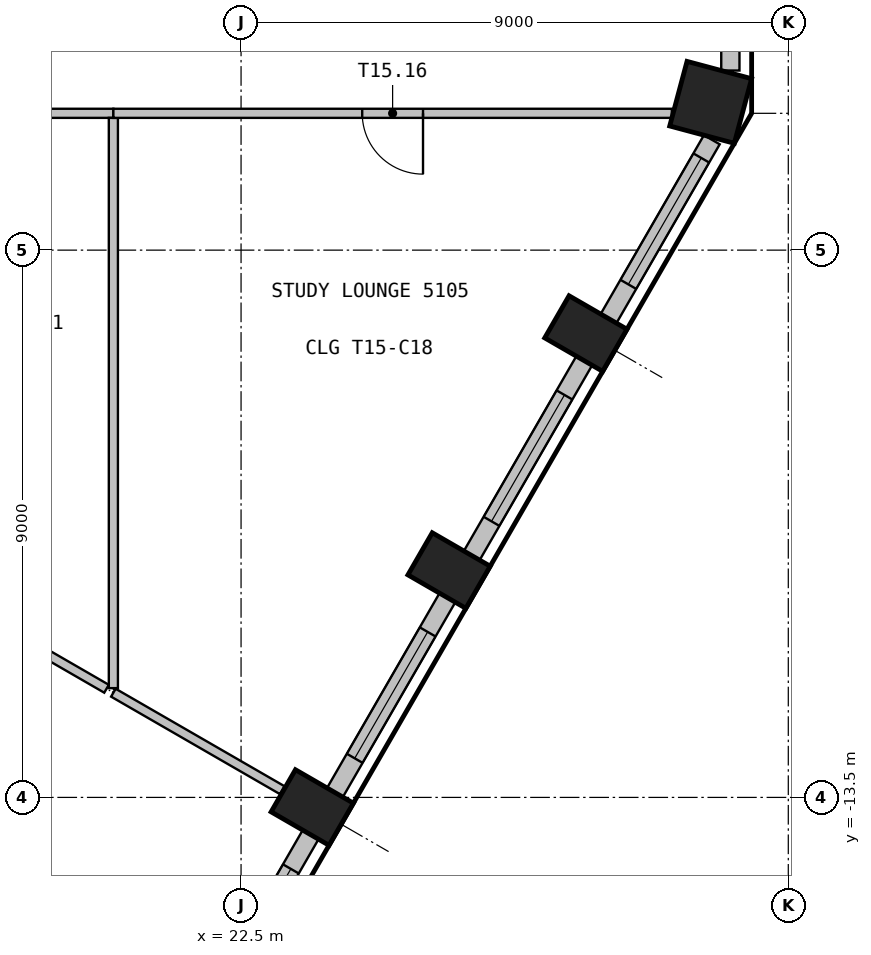
"""IFC4 building model, lengths in metres.
Left out: names, types, materials, properties, quantities, classifications, styles, units other than length and angle.
Written with IfcOpenShell. Run it as: python <this file> out.ifc"""

import sys

from ifc_helpers import new_model, si_unit, direction, frame, frame_2d, origin, origin_2d, place, context, subcontext, project, spatial, rectangle, extrude, element, fill, save


model = new_model("IFC4")
c1 = context("Model", 3, precision=1e-05, world=origin(), true_north=direction((0.0, 1.0)))
c2 = subcontext(c1, "Body", "Model", "MODEL_VIEW")
j1 = project(units=[si_unit("LENGTHUNIT", "METRE"), si_unit("PLANEANGLEUNIT", "RADIAN")], contexts=[c1])
p1 = place(None, origin())
s1 = spatial("IfcSite", under=j1, at=p1, CompositionType="ELEMENT")
p2 = place(p1, origin())
s2 = spatial("IfcBuilding", under=s1, at=p2, CompositionType="ELEMENT")
p3 = place(p2, frame((0.0, 0.0, 207.3)))
s3 = spatial("IfcBuildingStorey", under=s2, at=p3, CompositionType="ELEMENT", Elevation=207.3)
for number, where, z_axis, x_axis in (
    (1, (23.671, -13.666, 0.0), (0.0, 0.0, 1.0), (0.5, 0.866, 0.0)),
    (2, (25.921, -9.769, 0.0), (0.0, 0.0, 1.0), (0.5, 0.866, 0.0)),
    (3, (28.171, -5.872, 0.0), (0.0, 0.0, 1.0), (0.5, 0.866, 0.0)),
):
    element("IfcColumn", number, at=place(p3, frame(where, z_axis=z_axis, x_axis=x_axis)), inside=s3, PredefinedType="COLUMN", context=c2, shape_type="SweptSolid", body=[
        extrude(rectangle(XDim=0.8, YDim=1.1, at=origin_2d()), origin(), (0.0, 0.0, 1.0), 3.55),
    ])
p4 = place(p3, frame((30.223, -2.07, 0.0), z_axis=(0.0, 0.0, 1.0), x_axis=(0.258819045103, 0.965925826289, 0.0)))
e4 = element("IfcColumn", 4, at=p4, inside=s3, PredefinedType="COLUMN", context=c2, shape_type="SweptSolid", body=[
    extrude(rectangle(XDim=1.1, YDim=1.1, at=origin_2d()), origin(), (0.0, 0.0, 1.0), 3.55),
])
p5 = place(p3, frame((21.794, -17.317, 0.0), z_axis=(0.0, 0.0, 1.0), x_axis=(0.500029062817, 0.866008623709, 0.0)))
e5 = element("IfcWall", 5, at=p5, inside=s3, PredefinedType="SOLIDWALL", context=c2, shape_type="SweptSolid", body=[
    extrude(rectangle(XDim=3.699, YDim=0.3, at=frame_2d((1.85, 0.0))), origin(), (0.0, 0.0, 1.0), 3.55),
])
p6 = place(p5, frame((0.649, 0.0, 0.9)))
e6 = element("IfcOpeningElement", 6, at=p6, cuts=e5, PredefinedType="OPENING", context=c2, shape_type="SweptSolid", body=[
    extrude(rectangle(XDim=2.4, YDim=2.1, at=frame_2d((1.2, 1.05))), frame((0.0, 0.16, 0.0), z_axis=(0.0, -1.0, 0.0), x_axis=(1.0, 0.0, 0.0)), (0.0, 0.0, 1.0), 0.32),
])
p7 = place(p3, frame((24.044, -13.419, 0.0), z_axis=(0.0, 0.0, 1.0), x_axis=(0.500029062817, 0.866008623709, 0.0)))
e7 = element("IfcWall", 7, at=p7, inside=s3, PredefinedType="SOLIDWALL", context=c2, shape_type="SweptSolid", body=[
    extrude(rectangle(XDim=3.699, YDim=0.3, at=frame_2d((1.85, 0.0))), origin(), (0.0, 0.0, 1.0), 3.55),
])
p8 = place(p7, frame((0.649, 0.0, 0.9)))
e8 = element("IfcOpeningElement", 8, at=p8, cuts=e7, PredefinedType="OPENING", context=c2, shape_type="SweptSolid", body=[
    extrude(rectangle(XDim=2.4, YDim=2.1, at=frame_2d((1.2, 1.05))), frame((0.0, 0.16, 0.0), z_axis=(0.0, -1.0, 0.0), x_axis=(1.0, 0.0, 0.0)), (0.0, 0.0, 1.0), 0.32),
])
p9 = place(p3, frame((26.294, -9.522, 0.0), z_axis=(0.0, 0.0, 1.0), x_axis=(0.500029062817, 0.866008623709, 0.0)))
e9 = element("IfcWall", 9, at=p9, inside=s3, PredefinedType="SOLIDWALL", context=c2, shape_type="SweptSolid", body=[
    extrude(rectangle(XDim=3.699, YDim=0.3, at=frame_2d((1.85, 0.0))), origin(), (0.0, 0.0, 1.0), 3.55),
])
p10 = place(p9, frame((0.649, 0.0, 0.9)))
e10 = element("IfcOpeningElement", 10, at=p10, cuts=e9, PredefinedType="OPENING", context=c2, shape_type="SweptSolid", body=[
    extrude(rectangle(XDim=2.4, YDim=2.1, at=frame_2d((1.2, 1.05))), frame((0.0, 0.16, 0.0), z_axis=(0.0, -1.0, 0.0), x_axis=(1.0, 0.0, 0.0)), (0.0, 0.0, 1.0), 0.32),
])
p11 = place(p3, frame((28.544, -5.625, 0.0), z_axis=(0.0, 0.0, 1.0), x_axis=(0.500012868213, 0.866017974191, 0.0)))
e11 = element("IfcWall", 11, at=p11, inside=s3, PredefinedType="SOLIDWALL", context=c2, shape_type="SweptSolid", body=[
    extrude(rectangle(XDim=3.396, YDim=0.3, at=frame_2d((1.698, 0.0))), origin(), (0.0, 0.0, 1.0), 3.55),
])
p12 = place(p11, frame((0.649, 0.0, 0.9)))
e12 = element("IfcOpeningElement", 12, at=p12, cuts=e11, PredefinedType="OPENING", context=c2, shape_type="SweptSolid", body=[
    extrude(rectangle(XDim=2.4, YDim=2.1, at=frame_2d((1.2, 1.05))), frame((0.0, 0.16, 0.0), z_axis=(0.0, -1.0, 0.0), x_axis=(1.0, 0.0, 0.0)), (0.0, 0.0, 1.0), 0.32),
])
p13 = place(p3, frame((30.547, -1.546, 0.0), z_axis=(0.0, 0.0, 1.0), x_axis=(0.0, 1.0, 0.0)))
e13 = element("IfcWall", 13, at=p13, inside=s3, PredefinedType="SOLIDWALL", context=c2, shape_type="SweptSolid", body=[
    extrude(rectangle(XDim=3.093, YDim=0.3, at=frame_2d((1.546, 0.0))), origin(), (0.0, 0.0, 1.0), 3.55),
])
p14 = place(p13, frame((0.346, 0.0, 0.9)))
e14 = element("IfcOpeningElement", 14, at=p14, cuts=e13, PredefinedType="OPENING", context=c2, shape_type="SweptSolid", body=[
    extrude(rectangle(XDim=2.4, YDim=2.1, at=frame_2d((1.2, 1.05))), frame((0.0, 0.16, 0.0), z_axis=(0.0, -1.0, 0.0), x_axis=(1.0, 0.0, 0.0)), (0.0, 0.0, 1.0), 0.32),
])
p15 = place(p3, frame((15.965, -9.218, 0.0), z_axis=(0.0, 0.0, 1.0), x_axis=(0.866034070548, -0.499984988425, 0.0)))
e15 = element("IfcWall", 15, at=p15, inside=s3, PredefinedType="PARTITIONING", context=c2, shape_type="SweptSolid", body=[
    extrude(rectangle(XDim=4.991, YDim=0.15, at=frame_2d((2.496, 0.0))), origin(), (0.0, 0.0, 1.0), 3.55),
])
p16 = place(p3, frame((20.4, -2.25, 0.0), z_axis=(0.0, 0.0, 1.0), x_axis=(-1.0, 0.0, 0.0)))
e16 = element("IfcWall", 16, at=p16, inside=s3, PredefinedType="PARTITIONING", context=c2, shape_type="SweptSolid", body=[
    extrude(rectangle(XDim=4.425, YDim=0.15, at=frame_2d((2.212, 0.0))), origin(), (0.0, 0.0, 1.0), 3.55),
])
p17 = place(p3, frame((20.4, -2.325, 0.0), z_axis=(0.0, 0.0, 1.0), x_axis=(0.0, -1.0, 0.0)))
e17 = element("IfcWall", 17, at=p17, inside=s3, PredefinedType="PARTITIONING", context=c2, shape_type="SweptSolid", body=[
    extrude(rectangle(XDim=9.378, YDim=0.15, at=frame_2d((4.689, 0.0))), origin(), (0.0, 0.0, 1.0), 3.55),
])
p18 = place(p3, frame((20.4, -11.778, 0.0), z_axis=(0.0, 0.0, 1.0), x_axis=(0.866089241828, -0.499889412961, 0.0)))
e18 = element("IfcWall", 18, at=p18, inside=s3, PredefinedType="PARTITIONING", context=c2, shape_type="SweptSolid", body=[
    extrude(rectangle(XDim=3.207, YDim=0.15, at=frame_2d((1.604, 0.0))), origin(), (0.0, 0.0, 1.0), 3.55),
])
p19 = place(p3, frame((29.585, -2.25, 0.0), z_axis=(0.0, 0.0, 1.0), x_axis=(-1.0, 0.0, 0.0)))
e19 = element("IfcWall", 19, at=p19, inside=s3, PredefinedType="PARTITIONING", context=c2, shape_type="SweptSolid", body=[
    extrude(rectangle(XDim=9.185, YDim=0.15, at=frame_2d((4.593, 0.0))), origin(), (0.0, 0.0, 1.0), 3.55),
])
p20 = place(p19, frame((4.093, 0.0, 0.0)))
e20 = element("IfcOpeningElement", 20, at=p20, cuts=e19, PredefinedType="OPENING", context=c2, shape_type="SweptSolid", body=[
    extrude(rectangle(XDim=1.0, YDim=2.1, at=frame_2d((0.5, 1.05))), frame((0.0, 0.085, 0.0), z_axis=(0.0, -1.0, 0.0), x_axis=(1.0, 0.0, 0.0)), (0.0, 0.0, 1.0), 0.17),
])
p21 = place(p6, origin())
e21 = element("IfcWindow", 21, at=p21, inside=s3, PartitioningType="SINGLE_PANEL", PredefinedType="WINDOW", context=c2, shape_type="SweptSolid", body=[
    extrude(rectangle(XDim=2.4, YDim=2.1, at=frame_2d((1.2, 1.05))), frame((0.0, 0.03, 0.0), z_axis=(0.0, -1.0, 0.0), x_axis=(1.0, 0.0, 0.0)), (0.0, 0.0, 1.0), 0.06),
])
fill(e6, e21)
p22 = place(p8, origin())
e22 = element("IfcWindow", 22, at=p22, inside=s3, PartitioningType="SINGLE_PANEL", PredefinedType="WINDOW", context=c2, shape_type="SweptSolid", body=[
    extrude(rectangle(XDim=2.4, YDim=2.1, at=frame_2d((1.2, 1.05))), frame((0.0, 0.03, 0.0), z_axis=(0.0, -1.0, 0.0), x_axis=(1.0, 0.0, 0.0)), (0.0, 0.0, 1.0), 0.06),
])
fill(e8, e22)
p23 = place(p10, origin())
e23 = element("IfcWindow", 23, at=p23, inside=s3, PartitioningType="SINGLE_PANEL", PredefinedType="WINDOW", context=c2, shape_type="SweptSolid", body=[
    extrude(rectangle(XDim=2.4, YDim=2.1, at=frame_2d((1.2, 1.05))), frame((0.0, 0.03, 0.0), z_axis=(0.0, -1.0, 0.0), x_axis=(1.0, 0.0, 0.0)), (0.0, 0.0, 1.0), 0.06),
])
fill(e10, e23)
p24 = place(p12, origin())
e24 = element("IfcWindow", 24, at=p24, inside=s3, PartitioningType="SINGLE_PANEL", PredefinedType="WINDOW", context=c2, shape_type="SweptSolid", body=[
    extrude(rectangle(XDim=2.4, YDim=2.1, at=frame_2d((1.2, 1.05))), frame((0.0, 0.03, 0.0), z_axis=(0.0, -1.0, 0.0), x_axis=(1.0, 0.0, 0.0)), (0.0, 0.0, 1.0), 0.06),
])
fill(e12, e24)
p25 = place(p20, origin())
e25 = element("IfcDoor", 25, at=p25, inside=s3, OperationType="SINGLE_SWING_RIGHT", PredefinedType="DOOR", context=c2, shape_type="SweptSolid", body=[
    extrude(rectangle(XDim=1.0, YDim=2.1, at=frame_2d((0.5, 1.05))), frame((0.0, 0.025, 0.0), z_axis=(0.0, -1.0, 0.0), x_axis=(1.0, 0.0, 0.0)), (0.0, 0.0, 1.0), 0.05),
])
fill(e20, e25)
save(model, sys.argv[1])
